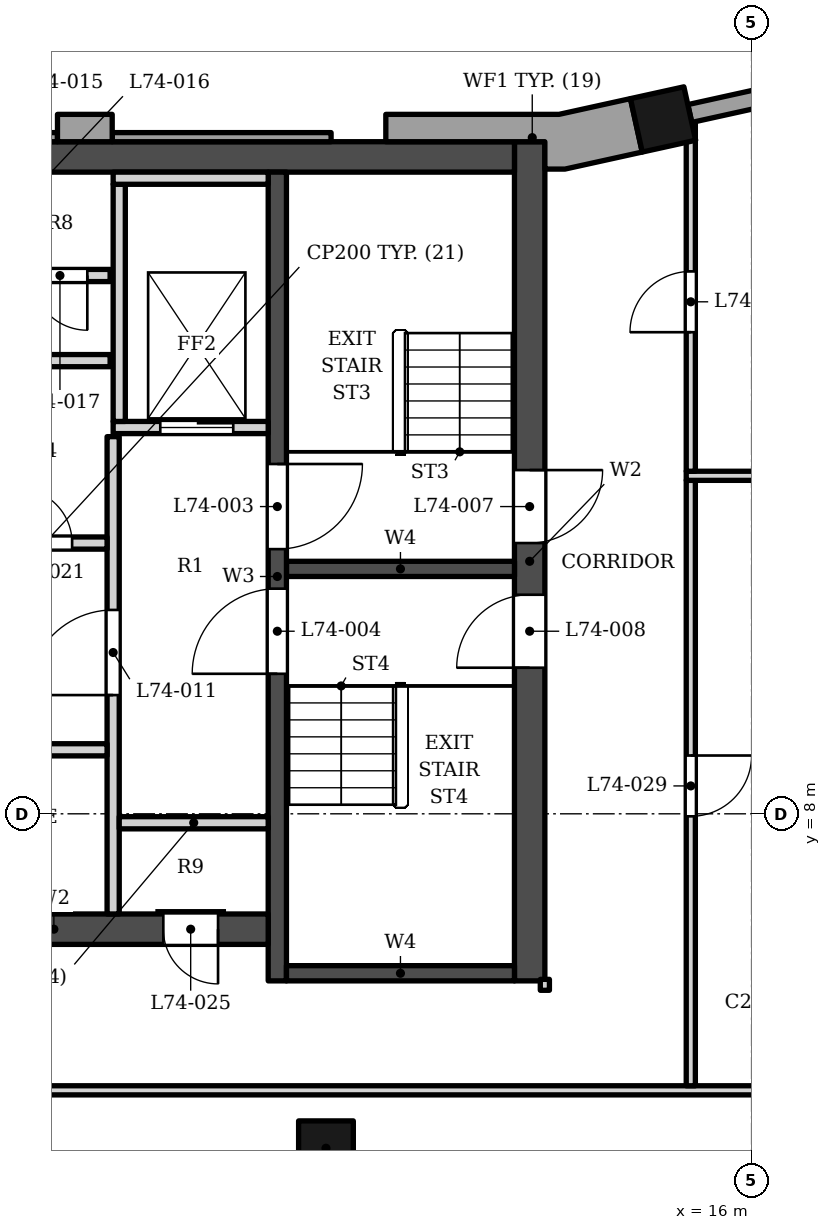
"""IFC4 building model, lengths in metres.
Left out: names, types, materials, properties, quantities, classifications, styles, units other than length and angle.
Written with IfcOpenShell. Run it as: python <this file> out.ifc"""

import sys

from ifc_helpers import new_model, si_unit, direction, frame, frame_2d, origin, origin_2d, place, context, subcontext, project, spatial, polyline, rectangle, outline, extrude, element, fill, save


model = new_model("IFC4")
c1 = context("Model", 3, precision=1e-05, world=origin(), true_north=direction((0.0, 1.0)))
c2 = subcontext(c1, "Body", "Model", "MODEL_VIEW")
j1 = project(units=[si_unit("LENGTHUNIT", "METRE"), si_unit("PLANEANGLEUNIT", "RADIAN")], contexts=[c1])
p1 = place(None, origin())
s1 = spatial("IfcSite", under=j1, at=p1, CompositionType="ELEMENT")
p2 = place(p1, origin())
s2 = spatial("IfcBuilding", under=s1, at=p2, CompositionType="ELEMENT")
p3 = place(p2, frame((0.0, 0.0, 315.5)))
s3 = spatial("IfcBuildingStorey", under=s2, at=p3, CompositionType="ELEMENT", Elevation=315.5)
p4 = place(p3, frame((-12.1, 18.802, 0.0), z_axis=(0.0, 0.0, 1.0), x_axis=(1.0, 0.0, 0.0)))
e1 = element("IfcWall", 1, at=p4, inside=s3, PredefinedType="SHEAR", context=c2, shape_type="SweptSolid", body=[
    extrude(rectangle(XDim=24.2, YDim=0.5, at=frame_2d((12.1, 0.0))), origin(), (0.0, 0.0, 1.0), 5.0),
])
p5 = place(p3, frame((12.35, 5.253, 0.0), z_axis=(0.0, 0.0, 1.0), x_axis=(0.0, 1.0, 0.0)))
e2 = element("IfcWall", 2, at=p5, inside=s3, PredefinedType="SHEAR", context=c2, shape_type="SweptSolid", body=[
    extrude(rectangle(XDim=13.8, YDim=0.5, at=frame_2d((6.9, 0.0))), origin(), (0.0, 0.0, 1.0), 5.0),
])
p6 = place(p5, frame((7.2, 0.0, 0.0)))
e3 = element("IfcOpeningElement", 3, at=p6, cuts=e2, PredefinedType="OPENING", context=c2, shape_type="SweptSolid", body=[
    extrude(rectangle(XDim=1.2, YDim=2.1, at=frame_2d((0.6, 1.05))), frame((0.0, 0.26, 0.0), z_axis=(0.0, -1.0, 0.0), x_axis=(1.0, 0.0, 0.0)), (0.0, 0.0, 1.0), 0.52),
])
p7 = place(p5, frame((5.15, 0.0, 0.0)))
e4 = element("IfcOpeningElement", 4, at=p7, cuts=e2, PredefinedType="OPENING", context=c2, shape_type="SweptSolid", body=[
    extrude(rectangle(XDim=1.2, YDim=2.1, at=frame_2d((0.6, 1.05))), frame((0.0, 0.26, 0.0), z_axis=(0.0, -1.0, 0.0), x_axis=(1.0, 0.0, 0.0)), (0.0, 0.0, 1.0), 0.52),
])
p8 = place(p3, frame((8.2, 5.253, 0.0), z_axis=(0.0, 0.0, 1.0), x_axis=(0.0, 1.0, 0.0)))
e5 = element("IfcWall", 5, at=p8, inside=s3, PredefinedType="SHEAR", context=c2, shape_type="SweptSolid", body=[
    extrude(rectangle(XDim=13.3, YDim=0.3, at=frame_2d((6.65, 0.0))), origin(), (0.0, 0.0, 1.0), 5.0),
])
p9 = place(p8, frame((7.1, 0.0, 0.0)))
e6 = element("IfcOpeningElement", 6, at=p9, cuts=e5, PredefinedType="OPENING", context=c2, shape_type="SweptSolid", body=[
    extrude(rectangle(XDim=1.4, YDim=2.1, at=frame_2d((0.7, 1.05))), frame((0.0, 0.16, 0.0), z_axis=(0.0, -1.0, 0.0), x_axis=(1.0, 0.0, 0.0)), (0.0, 0.0, 1.0), 0.32),
])
p10 = place(p8, frame((5.05, 0.0, 0.0)))
e7 = element("IfcOpeningElement", 7, at=p10, cuts=e5, PredefinedType="OPENING", context=c2, shape_type="SweptSolid", body=[
    extrude(rectangle(XDim=1.4, YDim=2.1, at=frame_2d((0.7, 1.05))), frame((0.0, 0.16, 0.0), z_axis=(0.0, -1.0, 0.0), x_axis=(1.0, 0.0, 0.0)), (0.0, 0.0, 1.0), 0.32),
])
for number, where, z_axis, x_axis in (
    (8, (8.35, 12.028, 0.0), (0.0, 0.0, 1.0), (1.0, 0.0, 0.0)),
    (9, (8.35, 5.378, 0.0), (0.0, 0.0, 1.0), (1.0, 0.0, 0.0)),
):
    element("IfcWall", number, at=place(p3, frame(where, z_axis=z_axis, x_axis=x_axis)), inside=s3, PredefinedType="SHEAR", context=c2, shape_type="SweptSolid", body=[
        extrude(rectangle(XDim=3.75, YDim=0.25, at=frame_2d((1.875, 0.0))), origin(), (0.0, 0.0, 1.0), 5.0),
    ])
p11 = place(p3, frame((1.0, 6.103, 0.0), z_axis=(0.0, 0.0, 1.0), x_axis=(1.0, 0.0, 0.0)))
e10 = element("IfcWall", 10, at=p11, inside=s3, PredefinedType="SHEAR", context=c2, shape_type="SweptSolid", body=[
    extrude(rectangle(XDim=7.05, YDim=0.5, at=frame_2d((3.525, 0.0))), origin(), (0.0, 0.0, 1.0), 5.0),
])
p12 = place(p11, frame((5.325, 0.0, 0.0)))
e11 = element("IfcOpeningElement", 11, at=p12, cuts=e10, PredefinedType="OPENING", context=c2, shape_type="SweptSolid", body=[
    extrude(rectangle(XDim=0.9, YDim=2.1, at=frame_2d((0.45, 1.05))), frame((0.0, 0.26, 0.0), z_axis=(0.0, -1.0, 0.0), x_axis=(1.0, 0.0, 0.0)), (0.0, 0.0, 1.0), 0.52),
])
for number, where, z_axis, x_axis in (
    (12, (9.0, 2.5, 0.0), (0.0, 0.0, 1.0), (1.0, 0.0, 0.0)),
    (13, (14.544, 19.419, 0.0), (0.0, 0.0, 1.0), (-0.977, -0.215, 0.0)),
):
    element("IfcColumn", number, at=place(p3, frame(where, z_axis=z_axis, x_axis=x_axis)), inside=s3, PredefinedType="COLUMN", context=c2, shape_type="SweptSolid", body=[
        extrude(rectangle(XDim=0.9, YDim=0.9, at=origin_2d()), origin(), (0.0, 0.0, 1.0), 5.0),
    ])
p13 = place(p3, frame((18.499, 20.292, 0.0), z_axis=(0.0, 0.0, 1.0), x_axis=(-0.976513072969, -0.215458159096, 0.0)))
e14 = element("IfcWall", 14, at=p13, inside=s3, PredefinedType="ELEMENTEDWALL", context=c2, shape_type="SweptSolid", body=[
    extrude(rectangle(XDim=3.6, YDim=0.3, at=frame_2d((1.8, 0.0))), origin(), (0.0, 0.0, 1.0), 3.8),
])
p14 = place(p3, origin())
e15 = element("IfcWall", 15, at=p14, inside=s3, PredefinedType="SOLIDWALL", context=c2, shape_type="SweptSolid", body=[
    extrude(outline(polyline([(4.584, 19.502), (4.584, 19.052), (5.484, 19.052), (5.484, 19.502), (4.584, 19.502)])), origin(), (0.0, 0.0, 1.0), 3.8),
])
p15 = place(p3, origin())
e16 = element("IfcWall", 16, at=p15, inside=s3, PredefinedType="ELEMENTEDWALL", context=c2, shape_type="SweptSolid", body=[
    extrude(outline(polyline([(9.084, 19.203), (5.484, 19.203), (5.484, 19.052), (9.084, 19.052), (9.084, 19.203)])), origin(), (0.0, 0.0, 1.0), 3.8),
])
p16 = place(p3, origin())
e17 = element("IfcWall", 17, at=p16, inside=s3, PredefinedType="ELEMENTEDWALL", context=c2, shape_type="SweptSolid", body=[
    extrude(outline(polyline([(4.584, 19.203), (0.984, 19.203), (0.984, 19.052), (4.584, 19.052), (4.584, 19.203)])), origin(), (0.0, 0.0, 1.0), 3.8),
])
p17 = place(p3, origin())
e18 = element("IfcWall", 18, at=p17, inside=s3, PredefinedType="SOLIDWALL", context=c2, shape_type="SweptSolid", body=[
    extrude(outline(polyline([(14.008, 19.761), (12.833, 19.502), (9.984, 19.502), (9.984, 19.052), (12.6, 19.052), (12.6, 18.603), (12.93, 18.603), (14.201, 18.883), (14.008, 19.761)])), origin(), (0.0, 0.0, 1.0), 3.8),
])
p18 = place(p3, frame((5.5, 6.353, 0.0), z_axis=(0.0, 0.0, 1.0), x_axis=(0.0, 1.0, 0.0)))
e19 = element("IfcWall", 19, at=p18, inside=s3, PredefinedType="SOLIDWALL", context=c2, shape_type="SweptSolid", body=[
    extrude(rectangle(XDim=7.85, YDim=0.2, at=frame_2d((3.925, 0.0))), origin(), (0.0, 0.0, 1.0), 4.8),
])
p19 = place(p18, frame((3.6, 0.0, 0.0)))
e20 = element("IfcOpeningElement", 20, at=p19, cuts=e19, PredefinedType="OPENING", context=c2, shape_type="SweptSolid", body=[
    extrude(rectangle(XDim=1.4, YDim=2.1, at=frame_2d((0.7, 1.05))), frame((0.0, 0.11, 0.0), z_axis=(0.0, -1.0, 0.0), x_axis=(1.0, 0.0, 0.0)), (0.0, 0.0, 1.0), 0.22),
])
p20 = place(p3, frame((5.6, 7.853, 0.0), z_axis=(0.0, 0.0, 1.0), x_axis=(1.0, 0.0, 0.0)))
e21 = element("IfcWall", 21, at=p20, inside=s3, PredefinedType="SOLIDWALL", context=c2, shape_type="SweptSolid", body=[
    extrude(rectangle(XDim=2.45, YDim=0.2, at=frame_2d((1.225, 0.0))), origin(), (0.0, 0.0, 1.0), 4.8),
])
p21 = place(p3, frame((1.1, 9.052, 0.0), z_axis=(0.0, 0.0, 1.0), x_axis=(1.0, 0.0, 0.0)))
e22 = element("IfcWall", 22, at=p21, inside=s3, PredefinedType="PARTITIONING", context=c2, shape_type="SweptSolid", body=[
    extrude(rectangle(XDim=4.3, YDim=0.2, at=frame_2d((2.15, 0.0))), origin(), (0.0, 0.0, 1.0), 4.8),
])
p22 = place(p21, frame((1.7, 0.0, 0.0)))
e23 = element("IfcOpeningElement", 23, at=p22, cuts=e22, PredefinedType="OPENING", context=c2, shape_type="SweptSolid", body=[
    extrude(rectangle(XDim=0.9, YDim=2.1, at=frame_2d((0.45, 1.05))), frame((0.0, 0.11, 0.0), z_axis=(0.0, -1.0, 0.0), x_axis=(1.0, 0.0, 0.0)), (0.0, 0.0, 1.0), 0.22),
])
p23 = place(p3, frame((3.35, 12.453, 0.0), z_axis=(0.0, 0.0, 1.0), x_axis=(1.0, 0.0, 0.0)))
e24 = element("IfcWall", 24, at=p23, inside=s3, PredefinedType="PARTITIONING", context=c2, shape_type="SweptSolid", body=[
    extrude(rectangle(XDim=2.05, YDim=0.2, at=frame_2d((1.025, 0.0))), origin(), (0.0, 0.0, 1.0), 4.8),
])
p24 = place(p23, frame((0.575, 0.0, 0.0)))
e25 = element("IfcOpeningElement", 25, at=p24, cuts=e24, PredefinedType="OPENING", context=c2, shape_type="SweptSolid", body=[
    extrude(rectangle(XDim=0.9, YDim=2.1, at=frame_2d((0.45, 1.05))), frame((0.0, 0.11, 0.0), z_axis=(0.0, -1.0, 0.0), x_axis=(1.0, 0.0, 0.0)), (0.0, 0.0, 1.0), 0.22),
])
p25 = place(p3, frame((5.5, 14.353, 0.0), z_axis=(0.0, 0.0, 1.0), x_axis=(1.0, 0.0, 0.0)))
e26 = element("IfcWall", 26, at=p25, inside=s3, PredefinedType="SOLIDWALL", context=c2, shape_type="SweptSolid", body=[
    extrude(rectangle(XDim=2.55, YDim=0.2, at=frame_2d((1.275, 0.0))), origin(), (0.0, 0.0, 1.0), 4.8),
])
p26 = place(p25, frame((0.775, 0.0, 0.0)))
e27 = element("IfcOpeningElement", 27, at=p26, cuts=e26, PredefinedType="OPENING", context=c2, shape_type="SweptSolid", body=[
    extrude(rectangle(XDim=1.2, YDim=2.1, at=frame_2d((0.6, 1.05))), frame((0.0, 0.11, 0.0), z_axis=(0.0, -1.0, 0.0), x_axis=(1.0, 0.0, 0.0)), (0.0, 0.0, 1.0), 0.22),
])
p27 = place(p3, frame((5.6, 14.453, 0.0), z_axis=(0.0, 0.0, 1.0), x_axis=(0.0, 1.0, 0.0)))
e28 = element("IfcWall", 28, at=p27, inside=s3, PredefinedType="SOLIDWALL", context=c2, shape_type="SweptSolid", body=[
    extrude(rectangle(XDim=3.9, YDim=0.2, at=frame_2d((1.95, 0.0))), origin(), (0.0, 0.0, 1.0), 4.8),
])
p28 = place(p3, frame((3.35, 15.453, 0.0), z_axis=(0.0, 0.0, 1.0), x_axis=(1.0, 0.0, 0.0)))
e29 = element("IfcWall", 29, at=p28, inside=s3, PredefinedType="SOLIDWALL", context=c2, shape_type="SweptSolid", body=[
    extrude(rectangle(XDim=2.1, YDim=0.2, at=frame_2d((1.05, 0.0))), origin(), (0.0, 0.0, 1.0), 4.8),
])
p29 = place(p3, frame((-1.6, 16.853, 0.0), z_axis=(0.0, 0.0, 1.0), x_axis=(1.0, 0.0, 0.0)))
e30 = element("IfcWall", 30, at=p29, inside=s3, PredefinedType="SOLIDWALL", context=c2, shape_type="SweptSolid", body=[
    extrude(rectangle(XDim=7.05, YDim=0.2, at=frame_2d((3.525, 0.0))), origin(), (0.0, 0.0, 1.0), 4.8),
])
p30 = place(p29, frame((0.525, 0.0, 0.0)))
e31 = element("IfcOpeningElement", 31, at=p30, cuts=e30, PredefinedType="OPENING", context=c2, shape_type="SweptSolid", body=[
    extrude(rectangle(XDim=0.9, YDim=2.1, at=frame_2d((0.45, 1.05))), frame((0.0, 0.11, 0.0), z_axis=(0.0, -1.0, 0.0), x_axis=(1.0, 0.0, 0.0)), (0.0, 0.0, 1.0), 0.22),
])
p31 = place(p29, frame((2.275, 0.0, 0.0)))
e32 = element("IfcOpeningElement", 32, at=p31, cuts=e30, PredefinedType="OPENING", context=c2, shape_type="SweptSolid", body=[
    extrude(rectangle(XDim=0.9, YDim=2.1, at=frame_2d((0.45, 1.05))), frame((0.0, 0.11, 0.0), z_axis=(0.0, -1.0, 0.0), x_axis=(1.0, 0.0, 0.0)), (0.0, 0.0, 1.0), 0.22),
])
p32 = place(p29, frame((4.025, 0.0, 0.0)))
e33 = element("IfcOpeningElement", 33, at=p32, cuts=e30, PredefinedType="OPENING", context=c2, shape_type="SweptSolid", body=[
    extrude(rectangle(XDim=0.9, YDim=2.1, at=frame_2d((0.45, 1.05))), frame((0.0, 0.11, 0.0), z_axis=(0.0, -1.0, 0.0), x_axis=(1.0, 0.0, 0.0)), (0.0, 0.0, 1.0), 0.22),
])
p33 = place(p29, frame((5.775, 0.0, 0.0)))
e34 = element("IfcOpeningElement", 34, at=p33, cuts=e30, PredefinedType="OPENING", context=c2, shape_type="SweptSolid", body=[
    extrude(rectangle(XDim=0.9, YDim=2.1, at=frame_2d((0.45, 1.05))), frame((0.0, 0.11, 0.0), z_axis=(0.0, -1.0, 0.0), x_axis=(1.0, 0.0, 0.0)), (0.0, 0.0, 1.0), 0.22),
])
p34 = place(p3, frame((5.5, 18.453, 0.0), z_axis=(0.0, 0.0, 1.0), x_axis=(1.0, 0.0, 0.0)))
e35 = element("IfcWall", 35, at=p34, inside=s3, PredefinedType="SOLIDWALL", context=c2, shape_type="SweptSolid", body=[
    extrude(rectangle(XDim=2.55, YDim=0.2, at=frame_2d((1.275, 0.0))), origin(), (0.0, 0.0, 1.0), 4.8),
])
p35 = place(p3, frame((4.095, 3.453, 0.0), z_axis=(0.0, 0.0, 1.0), x_axis=(1.0, 0.0, 0.0)))
e36 = element("IfcWall", 36, at=p35, inside=s3, PredefinedType="PARTITIONING", context=c2, shape_type="SweptSolid", body=[
    extrude(rectangle(XDim=13.627, YDim=0.15, at=frame_2d((6.813, 0.0))), origin(), (0.0, 0.0, 1.0), 4.1),
])
p36 = place(p3, frame((15.0, 3.528, 0.0), z_axis=(0.0, 0.0, 1.0), x_axis=(0.0, 1.0, 0.0)))
e37 = element("IfcWall", 37, at=p36, inside=s3, PredefinedType="PARTITIONING", context=c2, shape_type="SweptSolid", body=[
    extrude(rectangle(XDim=9.956, YDim=0.15, at=frame_2d((4.978, 0.0))), origin(), (0.0, 0.0, 1.0), 4.02),
])
p37 = place(p36, frame((4.431, 0.0, 0.0)))
e38 = element("IfcOpeningElement", 38, at=p37, cuts=e37, PredefinedType="OPENING", context=c2, shape_type="SweptSolid", body=[
    extrude(rectangle(XDim=1.0, YDim=2.1, at=frame_2d((0.5, 1.05))), frame((0.0, 0.085, 0.0), z_axis=(0.0, -1.0, 0.0), x_axis=(1.0, 0.0, 0.0)), (0.0, 0.0, 1.0), 0.17),
])
p38 = place(p3, frame((12.6, 5.098, 0.0), z_axis=(0.0, 0.0, 1.0), x_axis=(0.0, 1.0, 0.0)))
e39 = element("IfcWall", 39, at=p38, inside=s3, PredefinedType="PARTITIONING", context=c2, shape_type="SweptSolid", body=[
    extrude(rectangle(XDim=0.18, YDim=0.15, at=frame_2d((0.09, 0.0))), origin(), (0.0, 0.0, 1.0), 4.8),
])
p39 = place(p3, frame((14.925, 13.559, 0.0), z_axis=(0.0, 0.0, 1.0), x_axis=(1.0, 0.0, 0.0)))
e40 = element("IfcWall", 40, at=p39, inside=s3, PredefinedType="PARTITIONING", context=c2, shape_type="SweptSolid", body=[
    extrude(rectangle(XDim=10.837, YDim=0.15, at=frame_2d((5.418, 0.0))), origin(), (0.0, 0.0, 1.0), 4.043),
])
p40 = place(p3, frame((15.0, 13.634, 0.0), z_axis=(0.0, 0.0, 1.0), x_axis=(0.0, 1.0, 0.0)))
e41 = element("IfcWall", 41, at=p40, inside=s3, PredefinedType="PARTITIONING", context=c2, shape_type="SweptSolid", body=[
    extrude(rectangle(XDim=5.724, YDim=0.15, at=frame_2d((2.862, 0.0))), origin(), (0.0, 0.0, 1.0), 4.1),
])
p41 = place(p40, frame((2.286, 0.0, 0.0)))
e42 = element("IfcOpeningElement", 42, at=p41, cuts=e41, PredefinedType="OPENING", context=c2, shape_type="SweptSolid", body=[
    extrude(rectangle(XDim=1.0, YDim=2.1, at=frame_2d((0.5, 1.05))), frame((0.0, 0.085, 0.0), z_axis=(0.0, -1.0, 0.0), x_axis=(1.0, 0.0, 0.0)), (0.0, 0.0, 1.0), 0.17),
])
p42 = place(p26, origin())
e43 = element("IfcDoor", 43, at=p42, inside=s3, OperationType="DOUBLE_DOOR_SLIDING", PredefinedType="DOOR", context=c2, shape_type="SweptSolid", body=[
    extrude(rectangle(XDim=1.2, YDim=2.1, at=frame_2d((0.6, 1.05))), frame((0.0, 0.025, 0.0), z_axis=(0.0, -1.0, 0.0), x_axis=(1.0, 0.0, 0.0)), (0.0, 0.0, 1.0), 0.05),
])
fill(e27, e43)
p43 = place(p9, origin())
e44 = element("IfcDoor", 44, at=p43, inside=s3, OperationType="SINGLE_SWING_RIGHT", PredefinedType="DOOR", context=c2, shape_type="SweptSolid", body=[
    extrude(rectangle(XDim=1.4, YDim=2.1, at=frame_2d((0.7, 1.05))), frame((0.0, 0.025, 0.0), z_axis=(0.0, -1.0, 0.0), x_axis=(1.0, 0.0, 0.0)), (0.0, 0.0, 1.0), 0.05),
])
fill(e6, e44)
p44 = place(p10, origin())
e45 = element("IfcDoor", 45, at=p44, inside=s3, OperationType="SINGLE_SWING_LEFT", PredefinedType="DOOR", context=c2, shape_type="SweptSolid", body=[
    extrude(rectangle(XDim=1.4, YDim=2.1, at=frame_2d((0.7, 1.05))), frame((0.0, 0.025, 0.0), z_axis=(0.0, -1.0, 0.0), x_axis=(1.0, 0.0, 0.0)), (0.0, 0.0, 1.0), 0.05),
])
fill(e7, e45)
p45 = place(p6, origin())
e46 = element("IfcDoor", 46, at=p45, inside=s3, OperationType="SINGLE_SWING_RIGHT", PredefinedType="DOOR", context=c2, shape_type="SweptSolid", body=[
    extrude(rectangle(XDim=1.2, YDim=2.1, at=frame_2d((0.6, 1.05))), frame((0.0, 0.025, 0.0), z_axis=(0.0, -1.0, 0.0), x_axis=(1.0, 0.0, 0.0)), (0.0, 0.0, 1.0), 0.05),
])
fill(e3, e46)
p46 = place(p7, origin())
e47 = element("IfcDoor", 47, at=p46, inside=s3, OperationType="SINGLE_SWING_LEFT", PredefinedType="DOOR", context=c2, shape_type="SweptSolid", body=[
    extrude(rectangle(XDim=1.2, YDim=2.1, at=frame_2d((0.6, 1.05))), frame((0.0, 0.025, 0.0), z_axis=(0.0, -1.0, 0.0), x_axis=(1.0, 0.0, 0.0)), (0.0, 0.0, 1.0), 0.05),
])
fill(e4, e47)
p47 = place(p19, origin())
e48 = element("IfcDoor", 48, at=p47, inside=s3, OperationType="SINGLE_SWING_LEFT", PredefinedType="DOOR", context=c2, shape_type="SweptSolid", body=[
    extrude(rectangle(XDim=1.4, YDim=2.1, at=frame_2d((0.7, 1.05))), frame((0.0, 0.025, 0.0), z_axis=(0.0, -1.0, 0.0), x_axis=(1.0, 0.0, 0.0)), (0.0, 0.0, 1.0), 0.05),
])
fill(e20, e48)
p48 = place(p33, origin())
e49 = element("IfcDoor", 49, at=p48, inside=s3, OperationType="SINGLE_SWING_RIGHT", PredefinedType="DOOR", context=c2, shape_type="SweptSolid", body=[
    extrude(rectangle(XDim=0.9, YDim=2.1, at=frame_2d((0.45, 1.05))), frame((0.0, 0.025, 0.0), z_axis=(0.0, -1.0, 0.0), x_axis=(1.0, 0.0, 0.0)), (0.0, 0.0, 1.0), 0.05),
])
fill(e34, e49)
p49 = place(p24, origin())
e50 = element("IfcDoor", 50, at=p49, inside=s3, OperationType="SINGLE_SWING_LEFT", PredefinedType="DOOR", context=c2, shape_type="SweptSolid", body=[
    extrude(rectangle(XDim=0.9, YDim=2.1, at=frame_2d((0.45, 1.05))), frame((0.0, 0.025, 0.0), z_axis=(0.0, -1.0, 0.0), x_axis=(1.0, 0.0, 0.0)), (0.0, 0.0, 1.0), 0.05),
])
fill(e25, e50)
p50 = place(p12, origin())
e51 = element("IfcDoor", 51, at=p50, inside=s3, OperationType="SINGLE_SWING_RIGHT", PredefinedType="DOOR", context=c2, shape_type="SweptSolid", body=[
    extrude(rectangle(XDim=0.9, YDim=2.1, at=frame_2d((0.45, 1.05))), frame((0.0, 0.025, 0.0), z_axis=(0.0, -1.0, 0.0), x_axis=(1.0, 0.0, 0.0)), (0.0, 0.0, 1.0), 0.05),
])
fill(e11, e51)
p51 = place(p41, origin())
e52 = element("IfcDoor", 52, at=p51, inside=s3, OperationType="SINGLE_SWING_LEFT", PredefinedType="DOOR", context=c2, shape_type="SweptSolid", body=[
    extrude(rectangle(XDim=1.0, YDim=2.1, at=frame_2d((0.5, 1.05))), frame((0.0, 0.025, 0.0), z_axis=(0.0, -1.0, 0.0), x_axis=(1.0, 0.0, 0.0)), (0.0, 0.0, 1.0), 0.05),
])
fill(e42, e52)
p52 = place(p37, origin())
e53 = element("IfcDoor", 53, at=p52, inside=s3, OperationType="SINGLE_SWING_RIGHT", PredefinedType="DOOR", context=c2, shape_type="SweptSolid", body=[
    extrude(rectangle(XDim=1.0, YDim=2.1, at=frame_2d((0.5, 1.05))), frame((0.0, 0.025, 0.0), z_axis=(0.0, -1.0, 0.0), x_axis=(1.0, 0.0, 0.0)), (0.0, 0.0, 1.0), 0.05),
])
fill(e38, e53)
save(model, sys.argv[1])
